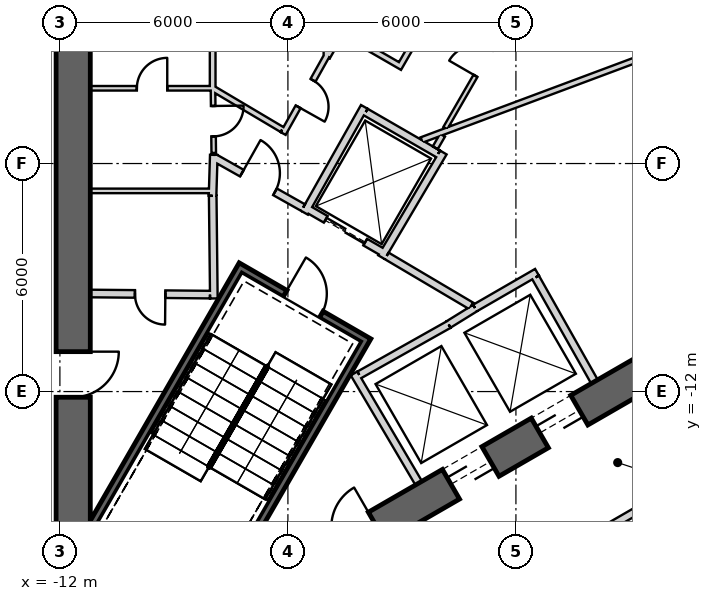
"""IFC4 building model, lengths in metres.
Left out: names, types, materials, properties, quantities, classifications, styles, units other than length and angle.
Written with IfcOpenShell. Run it as: python <this file> out.ifc"""

import sys

from ifc_helpers import new_model, si_unit, direction, frame, frame_2d, origin, place, context, subcontext, project, spatial, rectangle, extrude, element, fill, save


model = new_model("IFC4")
c1 = context("Model", 3, precision=1e-05, world=origin(), true_north=direction((0.0, 1.0)))
c2 = subcontext(c1, "Body", "Model", "MODEL_VIEW")
j1 = project(units=[si_unit("LENGTHUNIT", "METRE"), si_unit("PLANEANGLEUNIT", "RADIAN")], contexts=[c1])
p1 = place(None, origin())
s1 = spatial("IfcSite", under=j1, at=p1, CompositionType="ELEMENT")
p2 = place(p1, origin())
s2 = spatial("IfcBuilding", under=s1, at=p2, CompositionType="ELEMENT")
p3 = place(p2, frame((0.0, 0.0, 404.8)))
s3 = spatial("IfcBuildingStorey", under=s2, at=p3, CompositionType="ELEMENT", Elevation=404.8)
p4 = place(p3, frame((-11.65, 15.762, 0.0), z_axis=(0.0, 0.0, 1.0), x_axis=(0.0, -1.0, 0.0)))
e1 = element("IfcWall", 1, at=p4, inside=s3, PredefinedType="SHEAR", context=c2, shape_type="SweptSolid", body=[
    extrude(rectangle(XDim=31.523, YDim=0.9, at=frame_2d((15.762, 0.0))), origin(), (0.0, 0.0, 1.0), 5.5),
])
p5 = place(p4, frame((3.612, 0.0, 0.0)))
e2 = element("IfcOpeningElement", 2, at=p5, cuts=e1, PredefinedType="OPENING", context=c2, shape_type="SweptSolid", body=[
    extrude(rectangle(XDim=1.2, YDim=2.4, at=frame_2d((0.6, 1.2))), frame((0.0, 0.46, 0.0), z_axis=(0.0, -1.0, 0.0), x_axis=(1.0, 0.0, 0.0)), (0.0, 0.0, 1.0), 0.92),
])
p6 = place(p4, frame((26.712, 0.0, 0.0)))
e3 = element("IfcOpeningElement", 3, at=p6, cuts=e1, PredefinedType="OPENING", context=c2, shape_type="SweptSolid", body=[
    extrude(rectangle(XDim=1.2, YDim=2.4, at=frame_2d((0.6, 1.2))), frame((0.0, 0.46, 0.0), z_axis=(0.0, -1.0, 0.0), x_axis=(1.0, 0.0, 0.0)), (0.0, 0.0, 1.0), 0.92),
])
p7 = place(p3, frame((-7.825, -17.97, 0.0), z_axis=(0.0, 0.0, 1.0), x_axis=(0.866028369851, 0.499994862586, 0.0)))
e4 = element("IfcWall", 4, at=p7, inside=s3, PredefinedType="SHEAR", context=c2, shape_type="SweptSolid", body=[
    extrude(rectangle(XDim=31.523, YDim=0.9, at=frame_2d((15.762, 0.0))), origin(), (0.0, 0.0, 1.0), 5.5),
])
p8 = place(p7, frame((7.062, 0.0, 0.0)))
e5 = element("IfcOpeningElement", 5, at=p8, cuts=e4, PredefinedType="OPENING", context=c2, shape_type="SweptSolid", body=[
    extrude(rectangle(XDim=1.2, YDim=2.4, at=frame_2d((0.6, 1.2))), frame((0.0, 0.46, 0.0), z_axis=(0.0, -1.0, 0.0), x_axis=(1.0, 0.0, 0.0)), (0.0, 0.0, 1.0), 0.92),
])
p9 = place(p7, frame((9.762, 0.0, 0.0)))
e6 = element("IfcOpeningElement", 6, at=p9, cuts=e4, PredefinedType="OPENING", context=c2, shape_type="SweptSolid", body=[
    extrude(rectangle(XDim=1.2, YDim=2.4, at=frame_2d((0.6, 1.2))), frame((0.0, 0.46, 0.0), z_axis=(0.0, -1.0, 0.0), x_axis=(1.0, 0.0, 0.0)), (0.0, 0.0, 1.0), 0.92),
])
p10 = place(p7, frame((17.862, 0.0, 0.0)))
e7 = element("IfcOpeningElement", 7, at=p10, cuts=e4, PredefinedType="OPENING", context=c2, shape_type="SweptSolid", body=[
    extrude(rectangle(XDim=1.2, YDim=2.4, at=frame_2d((0.6, 1.2))), frame((0.0, 0.46, 0.0), z_axis=(0.0, -1.0, 0.0), x_axis=(1.0, 0.0, 0.0)), (0.0, 0.0, 1.0), 0.92),
])
p11 = place(p7, frame((20.562, 0.0, 0.0)))
e8 = element("IfcOpeningElement", 8, at=p11, cuts=e4, PredefinedType="OPENING", context=c2, shape_type="SweptSolid", body=[
    extrude(rectangle(XDim=1.2, YDim=2.4, at=frame_2d((0.6, 1.2))), frame((0.0, 0.46, 0.0), z_axis=(0.0, -1.0, 0.0), x_axis=(1.0, 0.0, 0.0)), (0.0, 0.0, 1.0), 0.92),
])
p12 = place(p7, frame((26.712, 0.0, 0.0)))
e9 = element("IfcOpeningElement", 9, at=p12, cuts=e4, PredefinedType="OPENING", context=c2, shape_type="SweptSolid", body=[
    extrude(rectangle(XDim=1.2, YDim=2.4, at=frame_2d((0.6, 1.2))), frame((0.0, 0.46, 0.0), z_axis=(0.0, -1.0, 0.0), x_axis=(1.0, 0.0, 0.0)), (0.0, 0.0, 1.0), 0.92),
])
p13 = place(p7, frame((3.612, 0.0, 0.0)))
e10 = element("IfcOpeningElement", 10, at=p13, cuts=e4, PredefinedType="OPENING", context=c2, shape_type="SweptSolid", body=[
    extrude(rectangle(XDim=1.2, YDim=2.4, at=frame_2d((0.6, 1.2))), frame((0.0, 0.46, 0.0), z_axis=(0.0, -1.0, 0.0), x_axis=(1.0, 0.0, 0.0)), (0.0, 0.0, 1.0), 0.92),
])
p14 = place(p3, frame((-2.558, -14.409, 0.0), z_axis=(0.0, 0.0, 1.0), x_axis=(-0.507997497166, 0.861358544901, 0.0)))
e11 = element("IfcWall", 11, at=p14, inside=s3, PredefinedType="PLUMBINGWALL", context=c2, shape_type="SweptSolid", body=[
    extrude(rectangle(XDim=3.35, YDim=0.2, at=frame_2d((1.675, 0.0))), origin(), (0.0, 0.0, 1.0), 5.25),
])
p15 = place(p3, frame((-1.769, -10.237, 0.0), z_axis=(0.0, 0.0, 1.0), x_axis=(-0.871534483978, -0.490334215854, 0.0)))
e12 = element("IfcWall", 12, at=p15, inside=s3, PredefinedType="PLUMBINGWALL", context=c2, shape_type="SweptSolid", body=[
    extrude(rectangle(XDim=2.7, YDim=0.2, at=frame_2d((1.35, 0.0))), origin(), (0.0, 0.0, 1.0), 5.25),
])
p16 = place(p3, frame((-1.076, -9.803, 0.0), z_axis=(0.0, 0.0, 1.0), x_axis=(-0.850341601995, -0.526231089842, 0.0)))
e13 = element("IfcWall", 13, at=p16, inside=s3, PredefinedType="PLUMBINGWALL", context=c2, shape_type="SweptSolid", body=[
    extrude(rectangle(XDim=0.817, YDim=0.2, at=frame_2d((0.408, 0.0))), origin(), (0.0, 0.0, 1.0), 5.25),
])
p17 = place(p3, frame((-1.077, -9.802, 0.0), z_axis=(0.0, 0.0, 1.0), x_axis=(0.865993522811, 0.500055215401, 0.0)))
e14 = element("IfcWall", 14, at=p17, inside=s3, PredefinedType="PLUMBINGWALL", context=c2, shape_type="SweptSolid", body=[
    extrude(rectangle(XDim=1.884, YDim=0.2, at=frame_2d((0.942, 0.0))), origin(), (0.0, 0.0, 1.0), 5.25),
])
p18 = place(p3, frame((0.517, -8.997, 0.0), z_axis=(0.0, 0.0, 1.0), x_axis=(0.491993409184, -0.87059892334, 0.0)))
e15 = element("IfcWall", 15, at=p18, inside=s3, PredefinedType="PLUMBINGWALL", context=c2, shape_type="SweptSolid", body=[
    extrude(rectangle(XDim=3.15, YDim=0.2, at=frame_2d((1.575, 0.0))), origin(), (0.0, 0.0, 1.0), 5.25),
])
p19 = place(p3, frame((-3.905, -10.563, -0.3), z_axis=(0.0, 0.0, 1.0), x_axis=(-0.500012932018, -0.866017937352, 0.0)))
e16 = element("IfcWall", 16, at=p19, inside=s3, PredefinedType="SHEAR", context=c2, shape_type="SweptSolid", body=[
    extrude(rectangle(XDim=8.1, YDim=0.2, at=frame_2d((4.05, 0.0))), origin(), (0.0, 0.0, 1.0), 5.55),
])
p20 = place(p3, frame((-7.196, -8.663, -0.3), z_axis=(0.0, 0.0, 1.0), x_axis=(-0.499997992926, -0.866026562566, 0.0)))
e17 = element("IfcWall", 17, at=p20, inside=s3, PredefinedType="SHEAR", context=c2, shape_type="SweptSolid", body=[
    extrude(rectangle(XDim=7.9, YDim=0.2, at=frame_2d((3.95, 0.0))), origin(), (0.0, 0.0, 1.0), 5.55),
])
p21 = place(p3, frame((-4.041, -10.599, -0.3), z_axis=(0.0, 0.0, 1.0), x_axis=(-0.866047807691, 0.499961193289, 0.0)))
e18 = element("IfcWall", 18, at=p21, inside=s3, PredefinedType="SHEAR", context=c2, shape_type="SweptSolid", body=[
    extrude(rectangle(XDim=3.6, YDim=0.2, at=frame_2d((1.8, 0.0))), origin(), (0.0, 0.0, 1.0), 5.55),
])
p22 = place(p21, frame((1.25, 0.0, 0.3)))
e19 = element("IfcOpeningElement", 19, at=p22, cuts=e18, PredefinedType="OPENING", context=c2, shape_type="SweptSolid", body=[
    extrude(rectangle(XDim=1.1, YDim=2.1, at=frame_2d((0.55, 1.05))), frame((0.0, 0.11, 0.0), z_axis=(0.0, -1.0, 0.0), x_axis=(1.0, 0.0, 0.0)), (0.0, 0.0, 1.0), 0.22),
])
p23 = place(p3, frame((-3.446, -8.368, 0.0), z_axis=(0.0, 0.0, 1.0), x_axis=(-0.866024647952, 0.500001309137, 0.0)))
e20 = element("IfcWall", 20, at=p23, inside=s3, PredefinedType="PLUMBINGWALL", context=c2, shape_type="SweptSolid", body=[
    extrude(rectangle(XDim=2.4, YDim=0.2, at=frame_2d((1.2, 0.0))), origin(), (0.0, 0.0, 1.0), 5.25),
])
p24 = place(p23, frame((0.6, 0.0, 0.0)))
e21 = element("IfcOpeningElement", 21, at=p24, cuts=e20, PredefinedType="OPENING", context=c2, shape_type="SweptSolid", body=[
    extrude(rectangle(XDim=1.2, YDim=2.4, at=frame_2d((0.6, 1.2))), frame((0.0, 0.11, 0.0), z_axis=(0.0, -1.0, 0.0), x_axis=(1.0, 0.0, 0.0)), (0.0, 0.0, 1.0), 0.22),
])
p25 = place(p3, frame((-3.953, -4.646, 0.0), z_axis=(0.0, 0.0, 1.0), x_axis=(0.86605622881, -0.499946605688, 0.0)))
e22 = element("IfcWall", 22, at=p25, inside=s3, PredefinedType="PLUMBINGWALL", context=c2, shape_type="SweptSolid", body=[
    extrude(rectangle(XDim=2.2, YDim=0.2, at=frame_2d((1.1, 0.0))), origin(), (0.0, 0.0, 1.0), 5.25),
])
p26 = place(p3, frame((-1.91, -5.71, 0.0), z_axis=(0.0, 0.0, 1.0), x_axis=(-0.508616218331, -0.860993346345, 0.0)))
e23 = element("IfcWall", 23, at=p26, inside=s3, PredefinedType="PLUMBINGWALL", context=c2, shape_type="SweptSolid", body=[
    extrude(rectangle(XDim=3.2, YDim=0.2, at=frame_2d((1.6, 0.0))), origin(), (0.0, 0.0, 1.0), 5.25),
])
p27 = place(p3, frame((-3.99, -4.509, 0.0), z_axis=(0.0, 0.0, 1.0), x_axis=(-0.491358283181, -0.870957540612, 0.0)))
e24 = element("IfcWall", 24, at=p27, inside=s3, PredefinedType="PLUMBINGWALL", context=c2, shape_type="SweptSolid", body=[
    extrude(rectangle(XDim=3.2, YDim=0.2, at=frame_2d((1.6, 0.0))), origin(), (0.0, 0.0, 1.0), 5.25),
])
p28 = place(p3, frame((-11.2, -4.02, 0.0), z_axis=(0.0, 0.0, 1.0), x_axis=(1.0, 0.0, 0.0)))
e25 = element("IfcWall", 25, at=p28, inside=s3, PredefinedType="PARTITIONING", context=c2, shape_type="SweptSolid", body=[
    extrude(rectangle(XDim=3.25, YDim=0.12, at=frame_2d((1.625, 0.0))), origin(), (0.0, 0.0, 1.0), 5.25),
])
p29 = place(p28, frame((1.225, 0.0, 0.0)))
e26 = element("IfcOpeningElement", 26, at=p29, cuts=e25, PredefinedType="OPENING", context=c2, shape_type="SweptSolid", body=[
    extrude(rectangle(XDim=0.8, YDim=2.1, at=frame_2d((0.4, 1.05))), frame((0.0, 0.07, 0.0), z_axis=(0.0, -1.0, 0.0), x_axis=(1.0, 0.0, 0.0)), (0.0, 0.0, 1.0), 0.14),
])
p30 = place(p3, frame((-7.98, 4.05, 0.0), z_axis=(0.0, 0.0, 1.0), x_axis=(0.0, -1.0, 0.0)))
e27 = element("IfcWall", 27, at=p30, inside=s3, PredefinedType="PLUMBINGWALL", context=c2, shape_type="SweptSolid", body=[
    extrude(rectangle(XDim=8.1, YDim=0.15, at=frame_2d((4.05, 0.0))), origin(), (0.0, 0.0, 1.0), 5.25),
])
p31 = place(p30, frame((3.65, 0.0, 0.0)))
e28 = element("IfcOpeningElement", 28, at=p31, cuts=e27, PredefinedType="OPENING", context=c2, shape_type="SweptSolid", body=[
    extrude(rectangle(XDim=0.8, YDim=2.1, at=frame_2d((0.4, 1.05))), frame((0.0, 0.085, 0.0), z_axis=(0.0, -1.0, 0.0), x_axis=(1.0, 0.0, 0.0)), (0.0, 0.0, 1.0), 0.17),
])
p32 = place(p3, frame((-11.2, -6.72, 0.0), z_axis=(0.0, 0.0, 1.0), x_axis=(1.0, 0.0, 0.0)))
e29 = element("IfcWall", 29, at=p32, inside=s3, PredefinedType="PARTITIONING", context=c2, shape_type="SweptSolid", body=[
    extrude(rectangle(XDim=3.25, YDim=0.12, at=frame_2d((1.625, 0.0))), origin(), (0.0, 0.0, 1.0), 5.25),
])
p33 = place(p3, frame((-7.983, -6.85, 0.0), z_axis=(0.0, 0.0, 1.0), x_axis=(0.030803413295, 0.999525462272, 0.0)))
e30 = element("IfcWall", 30, at=p33, inside=s3, PredefinedType="PARTITIONING", context=c2, shape_type="SweptSolid", body=[
    extrude(rectangle(XDim=1.078, YDim=0.2, at=frame_2d((0.539, 0.0))), origin(), (0.0, 0.0, 1.0), 5.25),
])
p34 = place(p3, frame((-7.951, -5.721, 0.0), z_axis=(0.0, 0.0, 1.0), x_axis=(-0.011976938133, 0.999928273904, 0.0)))
e31 = element("IfcWall", 31, at=p34, inside=s3, PredefinedType="PARTITIONING", context=c2, shape_type="SweptSolid", body=[
    extrude(rectangle(XDim=1.671, YDim=0.12, at=frame_2d((0.836, 0.0))), origin(), (0.0, 0.0, 1.0), 5.25),
])
p35 = place(p34, frame((0.436, 0.0, 0.0)))
e32 = element("IfcOpeningElement", 32, at=p35, cuts=e31, PredefinedType="OPENING", context=c2, shape_type="SweptSolid", body=[
    extrude(rectangle(XDim=0.8, YDim=2.1, at=frame_2d((0.4, 1.05))), frame((0.0, 0.07, 0.0), z_axis=(0.0, -1.0, 0.0), x_axis=(1.0, 0.0, 0.0)), (0.0, 0.0, 1.0), 0.14),
])
p36 = place(p3, frame((-7.949, -9.55, 0.0), z_axis=(0.0, 0.0, 1.0), x_axis=(-0.011121475088, 0.999938154483, 0.0)))
e33 = element("IfcWall", 33, at=p36, inside=s3, PredefinedType="PARTITIONING", context=c2, shape_type="SweptSolid", body=[
    extrude(rectangle(XDim=2.7, YDim=0.2, at=frame_2d((1.35, 0.0))), origin(), (0.0, 0.0, 1.0), 5.25),
])
p37 = place(p3, frame((-11.2, -9.42, 0.0), z_axis=(0.0, 0.0, 1.0), x_axis=(0.999957467379, -0.009222983926, 0.0)))
e34 = element("IfcWall", 34, at=p37, inside=s3, PredefinedType="PARTITIONING", context=c2, shape_type="SweptSolid", body=[
    extrude(rectangle(XDim=3.15, YDim=0.2, at=frame_2d((1.575, 0.0))), origin(), (0.0, 0.0, 1.0), 5.25),
])
p38 = place(p37, frame((1.175, 0.0, 0.0)))
e35 = element("IfcOpeningElement", 35, at=p38, cuts=e34, PredefinedType="OPENING", context=c2, shape_type="SweptSolid", body=[
    extrude(rectangle(XDim=0.8, YDim=2.1, at=frame_2d((0.4, 1.05))), frame((0.0, 0.11, 0.0), z_axis=(0.0, -1.0, 0.0), x_axis=(1.0, 0.0, 0.0)), (0.0, 0.0, 1.0), 0.22),
])
p39 = place(p3, frame((-3.401, -8.43, 0.0), z_axis=(0.0, 0.0, 1.0), x_axis=(0.860630814782, -0.509229418482, 0.0)))
e36 = element("IfcWall", 36, at=p39, inside=s3, PredefinedType="PARTITIONING", context=c2, shape_type="SweptSolid", body=[
    extrude(rectangle(XDim=2.582, YDim=0.2, at=frame_2d((1.291, 0.0))), origin(), (0.0, 0.0, 1.0), 5.25),
])
p40 = place(p3, frame((-7.96, -5.831, 0.0), z_axis=(0.0, 0.0, 1.0), x_axis=(0.871327438366, -0.490702043148, 0.0)))
e37 = element("IfcWall", 37, at=p40, inside=s3, PredefinedType="PARTITIONING", context=c2, shape_type="SweptSolid", body=[
    extrude(rectangle(XDim=2.708, YDim=0.2, at=frame_2d((1.354, 0.0))), origin(), (0.0, 0.0, 1.0), 5.25),
])
p41 = place(p40, frame((0.86, 0.0, 0.0)))
e38 = element("IfcOpeningElement", 38, at=p41, cuts=e37, PredefinedType="OPENING", context=c2, shape_type="SweptSolid", body=[
    extrude(rectangle(XDim=1.0, YDim=2.1, at=frame_2d((0.5, 1.05))), frame((0.0, 0.11, 0.0), z_axis=(0.0, -1.0, 0.0), x_axis=(1.0, 0.0, 0.0)), (0.0, 0.0, 1.0), 0.22),
])
p42 = place(p3, frame((4.807, -2.659, 0.0), z_axis=(0.0, 0.0, 1.0), x_axis=(-0.936818342118, -0.349816228714, 0.0)))
e39 = element("IfcWall", 39, at=p42, inside=s3, PredefinedType="PLUMBINGWALL", context=c2, shape_type="SweptSolid", body=[
    extrude(rectangle(XDim=7.78, YDim=0.15, at=frame_2d((3.89, 0.0))), origin(), (0.0, 0.0, 1.0), 5.25),
])
p43 = place(p3, frame((0.182, -1.535, 0.0), z_axis=(0.0, 0.0, 1.0), x_axis=(-0.499988401207, -0.866032100247, 0.0)))
e40 = element("IfcWall", 40, at=p43, inside=s3, PredefinedType="PARTITIONING", context=c2, shape_type="SweptSolid", body=[
    extrude(rectangle(XDim=4.079, YDim=0.12, at=frame_2d((2.04, 0.0))), origin(), (0.0, 0.0, 1.0), 5.25),
])
p44 = place(p43, frame((1.691, 0.0, 0.0)))
e41 = element("IfcOpeningElement", 41, at=p44, cuts=e40, PredefinedType="OPENING", context=c2, shape_type="SweptSolid", body=[
    extrude(rectangle(XDim=0.8, YDim=2.1, at=frame_2d((0.4, 1.05))), frame((0.0, 0.07, 0.0), z_axis=(0.0, -1.0, 0.0), x_axis=(1.0, 0.0, 0.0)), (0.0, 0.0, 1.0), 0.14),
])
p45 = place(p3, frame((-1.932, -5.256, 0.0), z_axis=(0.0, 0.0, 1.0), x_axis=(-0.499777709171, -0.866153705422, 0.0)))
e42 = element("IfcWall", 42, at=p45, inside=s3, PredefinedType="PLUMBINGWALL", context=c2, shape_type="SweptSolid", body=[
    extrude(rectangle(XDim=0.383, YDim=0.15, at=frame_2d((0.191, 0.0))), origin(), (0.0, 0.0, 1.0), 5.25),
])
p46 = place(p3, frame((-4.985, -3.235, 0.0), z_axis=(0.0, 0.0, 1.0), x_axis=(0.0, 1.0, 0.0)))
e43 = element("IfcWall", 43, at=p46, inside=s3, PredefinedType="PLUMBINGWALL", context=c2, shape_type="SweptSolid", body=[
    extrude(rectangle(XDim=6.469, YDim=0.15, at=frame_2d((3.235, 0.0))), origin(), (0.0, 0.0, 1.0), 5.25),
])
p47 = place(p3, frame((-6.125, -5.211, 0.0), z_axis=(0.0, 0.0, 1.0), x_axis=(0.488762436737, 0.87241691893, 0.0)))
e44 = element("IfcWall", 44, at=p47, inside=s3, PredefinedType="PLUMBINGWALL", context=c2, shape_type="SweptSolid", body=[
    extrude(rectangle(XDim=2.337, YDim=0.15, at=frame_2d((1.168, 0.0))), origin(), (0.0, 0.0, 1.0), 5.25),
])
p48 = place(p47, frame((0.806, 0.0, 0.0)))
e45 = element("IfcOpeningElement", 45, at=p48, cuts=e44, PredefinedType="OPENING", context=c2, shape_type="SweptSolid", body=[
    extrude(rectangle(XDim=0.8, YDim=2.1, at=frame_2d((0.4, 1.05))), frame((0.0, 0.085, 0.0), z_axis=(0.0, -1.0, 0.0), x_axis=(1.0, 0.0, 0.0)), (0.0, 0.0, 1.0), 0.17),
])
p49 = place(p3, frame((-7.95, -4.041, 0.0), z_axis=(0.0, 0.0, 1.0), x_axis=(0.860090281069, -0.510141851263, 0.0)))
e46 = element("IfcWall", 46, at=p49, inside=s3, PredefinedType="PLUMBINGWALL", context=c2, shape_type="SweptSolid", body=[
    extrude(rectangle(XDim=2.089, YDim=0.15, at=frame_2d((1.045, 0.0))), origin(), (0.0, 0.0, 1.0), 5.25),
])
p50 = place(p3, frame((-3.089, -3.5, 0.0), z_axis=(0.0, 0.0, 1.0), x_axis=(0.500025362525, 0.866010760229, 0.0)))
e47 = element("IfcWall", 47, at=p50, inside=s3, PredefinedType="PLUMBINGWALL", context=c2, shape_type="SweptSolid", body=[
    extrude(rectangle(XDim=3.209, YDim=0.15, at=frame_2d((1.604, 0.0))), origin(), (0.0, 0.0, 1.0), 5.25),
])
p51 = place(p50, frame((1.242, 0.0, 0.0)))
e48 = element("IfcOpeningElement", 48, at=p51, cuts=e47, PredefinedType="OPENING", context=c2, shape_type="SweptSolid", body=[
    extrude(rectangle(XDim=0.8, YDim=2.1, at=frame_2d((0.4, 1.05))), frame((0.0, 0.085, 0.0), z_axis=(0.0, -1.0, 0.0), x_axis=(1.0, 0.0, 0.0)), (0.0, 0.0, 1.0), 0.17),
])
p52 = place(p3, frame((-4.91, -2.361, 0.0), z_axis=(0.0, 0.0, 1.0), x_axis=(0.866022705876, -0.500004672885, 0.0)))
e49 = element("IfcWall", 49, at=p52, inside=s3, PredefinedType="PLUMBINGWALL", context=c2, shape_type="SweptSolid", body=[
    extrude(rectangle(XDim=2.072, YDim=0.15, at=frame_2d((1.036, 0.0))), origin(), (0.0, 0.0, 1.0), 5.25),
])
p53 = place(p3, frame((-4.957, -3.187, 0.0), z_axis=(0.0, 0.0, 1.0), x_axis=(0.499860530385, 0.866105911632, 0.0)))
e50 = element("IfcWall", 50, at=p53, inside=s3, PredefinedType="PLUMBINGWALL", context=c2, shape_type="SweptSolid", body=[
    extrude(rectangle(XDim=0.663, YDim=0.15, at=frame_2d((0.332, 0.0))), origin(), (0.0, 0.0, 1.0), 5.25),
])
p54 = place(p3, frame((1.009, -16.391, 0.0), z_axis=(0.0, 0.0, 1.0), x_axis=(0.866026744585, 0.499997677658, 0.0)))
e51 = element("IfcWall", 51, at=p54, inside=s3, PredefinedType="PARTITIONING", context=c2, shape_type="SweptSolid", body=[
    extrude(rectangle(XDim=13.617, YDim=0.2, at=frame_2d((6.808, 0.0))), origin(), (0.0, 0.0, 1.0), 5.25),
])
p55 = place(p54, frame((6.456, 0.0, 0.0)))
e52 = element("IfcOpeningElement", 52, at=p55, cuts=e51, PredefinedType="OPENING", context=c2, shape_type="SweptSolid", body=[
    extrude(rectangle(XDim=1.0, YDim=2.1, at=frame_2d((0.5, 1.05))), frame((0.0, 0.11, 0.0), z_axis=(0.0, -1.0, 0.0), x_axis=(1.0, 0.0, 0.0)), (0.0, 0.0, 1.0), 0.22),
])
p56 = place(p22, origin())
e53 = element("IfcDoor", 53, at=p56, inside=s3, OperationType="SINGLE_SWING_RIGHT", PredefinedType="USERDEFINED", context=c2, shape_type="SweptSolid", body=[
    extrude(rectangle(XDim=1.1, YDim=2.1, at=frame_2d((0.55, 1.05))), frame((0.0, 0.025, 0.0), z_axis=(0.0, -1.0, 0.0), x_axis=(1.0, 0.0, 0.0)), (0.0, 0.0, 1.0), 0.05),
])
fill(e19, e53)
p57 = place(p41, origin())
e54 = element("IfcDoor", 54, at=p57, inside=s3, OperationType="SINGLE_SWING_LEFT", PredefinedType="USERDEFINED", context=c2, shape_type="SweptSolid", body=[
    extrude(rectangle(XDim=1.0, YDim=2.1, at=frame_2d((0.5, 1.05))), frame((0.0, 0.025, 0.0), z_axis=(0.0, -1.0, 0.0), x_axis=(1.0, 0.0, 0.0)), (0.0, 0.0, 1.0), 0.05),
])
fill(e38, e54)
p58 = place(p24, origin())
e55 = element("IfcDoor", 55, at=p58, inside=s3, OperationType="SLIDING_TO_LEFT", PredefinedType="USERDEFINED", context=c2, shape_type="SweptSolid", body=[
    extrude(rectangle(XDim=1.2, YDim=2.4, at=frame_2d((0.6, 1.2))), frame((0.0, 0.025, 0.0), z_axis=(0.0, -1.0, 0.0), x_axis=(1.0, 0.0, 0.0)), (0.0, 0.0, 1.0), 0.05),
])
fill(e21, e55)
p59 = place(p44, origin())
e56 = element("IfcDoor", 56, at=p59, inside=s3, OperationType="SINGLE_SWING_RIGHT", PredefinedType="USERDEFINED", context=c2, shape_type="SweptSolid", body=[
    extrude(rectangle(XDim=0.8, YDim=2.1, at=frame_2d((0.4, 1.05))), frame((0.0, 0.025, 0.0), z_axis=(0.0, -1.0, 0.0), x_axis=(1.0, 0.0, 0.0)), (0.0, 0.0, 1.0), 0.05),
])
fill(e41, e56)
p60 = place(p48, origin())
e57 = element("IfcDoor", 57, at=p60, inside=s3, OperationType="SINGLE_SWING_LEFT", PredefinedType="USERDEFINED", context=c2, shape_type="SweptSolid", body=[
    extrude(rectangle(XDim=0.8, YDim=2.1, at=frame_2d((0.4, 1.05))), frame((0.0, 0.025, 0.0), z_axis=(0.0, -1.0, 0.0), x_axis=(1.0, 0.0, 0.0)), (0.0, 0.0, 1.0), 0.05),
])
fill(e45, e57)
p61 = place(p29, origin())
e58 = element("IfcDoor", 58, at=p61, inside=s3, OperationType="SINGLE_SWING_RIGHT", PredefinedType="USERDEFINED", context=c2, shape_type="SweptSolid", body=[
    extrude(rectangle(XDim=0.8, YDim=2.1, at=frame_2d((0.4, 1.05))), frame((0.0, 0.025, 0.0), z_axis=(0.0, -1.0, 0.0), x_axis=(1.0, 0.0, 0.0)), (0.0, 0.0, 1.0), 0.05),
])
fill(e26, e58)
p62 = place(p35, origin())
e59 = element("IfcDoor", 59, at=p62, inside=s3, OperationType="SINGLE_SWING_RIGHT", PredefinedType="USERDEFINED", context=c2, shape_type="SweptSolid", body=[
    extrude(rectangle(XDim=0.8, YDim=2.1, at=frame_2d((0.4, 1.05))), frame((0.0, 0.025, 0.0), z_axis=(0.0, -1.0, 0.0), x_axis=(1.0, 0.0, 0.0)), (0.0, 0.0, 1.0), 0.05),
])
fill(e32, e59)
p63 = place(p38, origin())
e60 = element("IfcDoor", 60, at=p63, inside=s3, OperationType="SINGLE_SWING_RIGHT", PredefinedType="USERDEFINED", context=c2, shape_type="SweptSolid", body=[
    extrude(rectangle(XDim=0.8, YDim=2.1, at=frame_2d((0.4, 1.05))), frame((0.0, 0.025, 0.0), z_axis=(0.0, -1.0, 0.0), x_axis=(1.0, 0.0, 0.0)), (0.0, 0.0, 1.0), 0.05),
])
fill(e35, e60)
p64 = place(p8, origin())
e61 = element("IfcDoor", 61, at=p64, inside=s3, OperationType="SLIDING_TO_LEFT", PredefinedType="USERDEFINED", context=c2, shape_type="SweptSolid", body=[
    extrude(rectangle(XDim=1.2, YDim=2.4, at=frame_2d((0.6, 1.2))), frame((0.0, 0.025, 0.0), z_axis=(0.0, -1.0, 0.0), x_axis=(1.0, 0.0, 0.0)), (0.0, 0.0, 1.0), 0.05),
])
fill(e5, e61)
p65 = place(p9, origin())
e62 = element("IfcDoor", 62, at=p65, inside=s3, OperationType="SLIDING_TO_LEFT", PredefinedType="USERDEFINED", context=c2, shape_type="SweptSolid", body=[
    extrude(rectangle(XDim=1.2, YDim=2.4, at=frame_2d((0.6, 1.2))), frame((0.0, 0.025, 0.0), z_axis=(0.0, -1.0, 0.0), x_axis=(1.0, 0.0, 0.0)), (0.0, 0.0, 1.0), 0.05),
])
fill(e6, e62)
p66 = place(p6, origin())
e63 = element("IfcDoor", 63, at=p66, inside=s3, OperationType="SINGLE_SWING_LEFT", PredefinedType="USERDEFINED", context=c2, shape_type="SweptSolid", body=[
    extrude(rectangle(XDim=1.2, YDim=2.4, at=frame_2d((0.6, 1.2))), frame((0.0, 0.025, 0.0), z_axis=(0.0, -1.0, 0.0), x_axis=(1.0, 0.0, 0.0)), (0.0, 0.0, 1.0), 0.05),
])
fill(e3, e63)
save(model, sys.argv[1])
